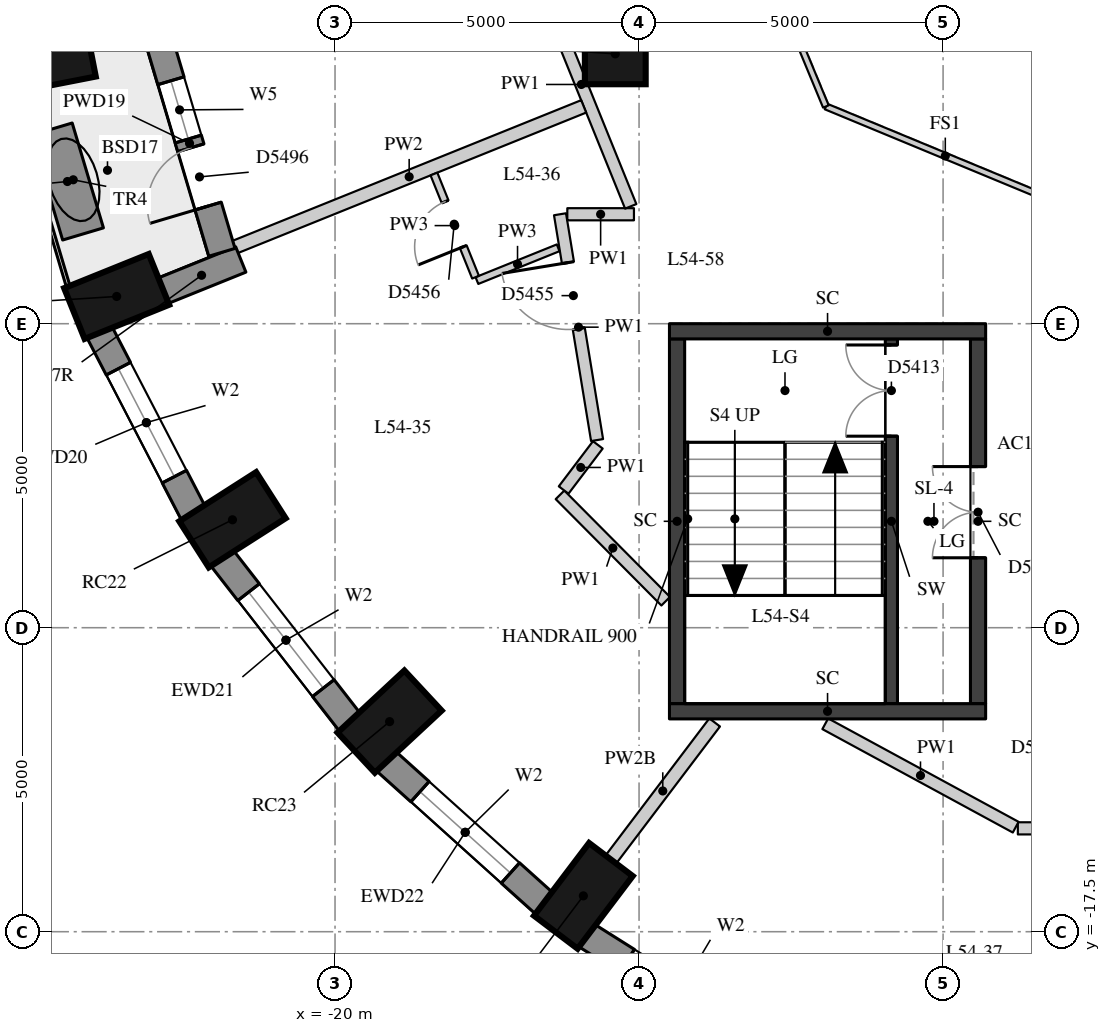
"""IFC4 building model, lengths in metres.
Left out: names, types, materials, properties, quantities, classifications, styles, units other than length and angle.
Written with IfcOpenShell. Run it as: python <this file> out.ifc"""

import sys

from ifc_helpers import new_model, si_unit, direction, frame, frame_2d, origin, origin_2d, place, context, subcontext, project, spatial, rectangle, extrude, element, fill, save


model = new_model("IFC4")
c1 = context("Model", 3, precision=1e-05, world=origin(), true_north=direction((0.0, 1.0)))
c2 = subcontext(c1, "Body", "Model", "MODEL_VIEW")
j1 = project(units=[si_unit("LENGTHUNIT", "METRE"), si_unit("PLANEANGLEUNIT", "RADIAN")], contexts=[c1])
p1 = place(None, origin())
s1 = spatial("IfcSite", under=j1, at=p1, CompositionType="ELEMENT")
p2 = place(p1, origin())
s2 = spatial("IfcBuilding", under=s1, at=p2, CompositionType="ELEMENT")
p3 = place(p2, frame((0.0, 0.0, 192.5)))
s3 = spatial("IfcBuildingStorey", under=s2, at=p3, CompositionType="ELEMENT", Elevation=192.5)
for number, where, z_axis, x_axis in (
    (1, (-24.757, -3.137, 0.0), (0.0, 0.0, 1.0), (-0.981, -0.192, 0.0)),
    (2, (-23.591, -7.052, 0.0), (0.0, 0.0, 1.0), (-0.927, -0.374, 0.0)),
    (3, (-21.687, -10.725, 0.0), (0.0, 0.0, 1.0), (-0.842, -0.539, 0.0)),
    (4, (-19.102, -14.045, 0.0), (0.0, 0.0, 1.0), (-0.732, -0.681, 0.0)),
    (5, (-15.916, -16.911, 0.0), (0.0, 0.0, 1.0), (-0.604, -0.797, 0.0)),
):
    element("IfcColumn", number, at=place(p3, frame(where, z_axis=z_axis, x_axis=x_axis)), inside=s3, PredefinedType="COLUMN", context=c2, shape_type="SweptSolid", body=[
        extrude(rectangle(XDim=1.5, YDim=0.9, at=origin_2d()), origin(), (0.0, 0.0, 1.0), 3.3),
    ])
p4 = place(p3, frame((-15.391, -3.062, 0.0), z_axis=(0.0, 0.0, 1.0), x_axis=(1.0, 0.0, 0.0)))
e6 = element("IfcColumn", 6, at=p4, inside=s3, PredefinedType="COLUMN", context=c2, shape_type="SweptSolid", body=[
    extrude(rectangle(XDim=1.0, YDim=1.0, at=origin_2d()), origin(), (0.0, 0.0, 1.0), 3.3),
])
p5 = place(p3, frame((-23.878, -7.632, 0.0), z_axis=(0.0, 0.0, 1.0), x_axis=(0.460232593174, -0.887798378113, 0.0)))
e7 = element("IfcWall", 7, at=p5, inside=s3, PredefinedType="SOLIDWALL", context=c2, shape_type="SweptSolid", body=[
    extrude(rectangle(XDim=3.371, YDim=0.45, at=frame_2d((1.685, 0.0))), origin(), (0.0, 0.0, 1.0), 3.02),
])
p6 = place(p5, frame((0.685, 0.0, 0.4)))
e8 = element("IfcOpeningElement", 8, at=p6, cuts=e7, PredefinedType="OPENING", context=c2, shape_type="SweptSolid", body=[
    extrude(rectangle(XDim=2.0, YDim=1.75, at=frame_2d((1.0, 0.875))), frame((0.0, 0.235, 0.0), z_axis=(0.0, -1.0, 0.0), x_axis=(1.0, 0.0, 0.0)), (0.0, 0.0, 1.0), 0.47),
])
p7 = place(p3, frame((-21.863, -11.348, 0.0), z_axis=(0.0, 0.0, 1.0), x_axis=(0.614255239631, -0.789107407509, 0.0)))
e9 = element("IfcWall", 9, at=p7, inside=s3, PredefinedType="SOLIDWALL", context=c2, shape_type="SweptSolid", body=[
    extrude(rectangle(XDim=3.438, YDim=0.45, at=frame_2d((1.719, 0.0))), origin(), (0.0, 0.0, 1.0), 3.02),
])
p8 = place(p7, frame((0.719, 0.0, 0.4)))
e10 = element("IfcOpeningElement", 10, at=p8, cuts=e9, PredefinedType="OPENING", context=c2, shape_type="SweptSolid", body=[
    extrude(rectangle(XDim=2.0, YDim=1.75, at=frame_2d((1.0, 0.875))), frame((0.0, 0.235, 0.0), z_axis=(0.0, -1.0, 0.0), x_axis=(1.0, 0.0, 0.0)), (0.0, 0.0, 1.0), 0.47),
])
p9 = place(p3, frame((-19.165, -14.69, 0.0), z_axis=(0.0, 0.0, 1.0), x_axis=(0.743442727602, -0.668799604348, 0.0)))
e11 = element("IfcWall", 11, at=p9, inside=s3, PredefinedType="SOLIDWALL", context=c2, shape_type="SweptSolid", body=[
    extrude(rectangle(XDim=3.513, YDim=0.45, at=frame_2d((1.756, 0.0))), origin(), (0.0, 0.0, 1.0), 3.02),
])
p10 = place(p9, frame((0.756, 0.0, 0.4)))
e12 = element("IfcOpeningElement", 12, at=p10, cuts=e11, PredefinedType="OPENING", context=c2, shape_type="SweptSolid", body=[
    extrude(rectangle(XDim=2.0, YDim=1.75, at=frame_2d((1.0, 0.875))), frame((0.0, 0.235, 0.0), z_axis=(0.0, -1.0, 0.0), x_axis=(1.0, 0.0, 0.0)), (0.0, 0.0, 1.0), 0.47),
])
p11 = place(p3, frame((-15.867, -17.559, 0.0), z_axis=(0.0, 0.0, 1.0), x_axis=(0.84616917791, -0.532914366813, 0.0)))
e13 = element("IfcWall", 13, at=p11, inside=s3, PredefinedType="SOLIDWALL", context=c2, shape_type="SweptSolid", body=[
    extrude(rectangle(XDim=3.587, YDim=0.45, at=frame_2d((1.793, 0.0))), origin(), (0.0, 0.0, 1.0), 3.02),
])
p12 = place(p11, frame((0.793, 0.0, 0.4)))
e14 = element("IfcOpeningElement", 14, at=p12, cuts=e13, PredefinedType="OPENING", context=c2, shape_type="SweptSolid", body=[
    extrude(rectangle(XDim=2.0, YDim=1.75, at=frame_2d((1.0, 0.875))), frame((0.0, 0.235, 0.0), z_axis=(0.0, -1.0, 0.0), x_axis=(1.0, 0.0, 0.0)), (0.0, 0.0, 1.0), 0.47),
])
p13 = place(p3, frame((-22.84, -6.964, 0.0), z_axis=(0.0, 0.0, 1.0), x_axis=(0.92737073954, 0.374143704271, 0.0)))
e15 = element("IfcWall", 15, at=p13, inside=s3, PredefinedType="SOLIDWALL", context=c2, shape_type="SweptSolid", body=[
    extrude(rectangle(XDim=1.391, YDim=0.45, at=frame_2d((0.695, 0.0))), origin(), (0.0, 0.0, 1.0), 3.02),
])
p14 = place(p3, frame((-22.925, -2.743, 0.0), z_axis=(0.0, 0.0, 1.0), x_axis=(0.284722093158, -0.958610103049, 0.0)))
e16 = element("IfcWall", 16, at=p14, inside=s3, PredefinedType="SOLIDWALL", context=c2, shape_type="SweptSolid", body=[
    extrude(rectangle(XDim=3.738, YDim=0.45, at=frame_2d((1.869, 0.0))), origin(), (0.0, 0.0, 1.0), 3.02),
])
p15 = place(p14, frame((0.794, 0.0, 0.4)))
e17 = element("IfcOpeningElement", 17, at=p15, cuts=e16, PredefinedType="OPENING", context=c2, shape_type="SweptSolid", body=[
    extrude(rectangle(XDim=1.0, YDim=1.75, at=frame_2d((0.5, 0.875))), frame((0.0, 0.235, 0.0), z_axis=(0.0, -1.0, 0.0), x_axis=(1.0, 0.0, 0.0)), (0.0, 0.0, 1.0), 0.47),
])
p16 = place(p14, frame((1.944, 0.0, 0.0)))
e18 = element("IfcOpeningElement", 18, at=p16, cuts=e16, PredefinedType="OPENING", context=c2, shape_type="SweptSolid", body=[
    extrude(rectangle(XDim=1.0, YDim=2.15, at=frame_2d((0.5, 1.075))), frame((0.0, 0.235, 0.0), z_axis=(0.0, -1.0, 0.0), x_axis=(1.0, 0.0, 0.0)), (0.0, 0.0, 1.0), 0.47),
])
p17 = place(p3, frame((-24.658, -4.299, 0.0), z_axis=(0.0, 0.0, 1.0), x_axis=(0.285505743157, -0.958376998171, 0.0)))
e19 = element("IfcWall", 19, at=p17, inside=s3, PredefinedType="USERDEFINED", context=c2, shape_type="SweptSolid", body=[
    extrude(rectangle(XDim=1.8, YDim=0.7, at=frame_2d((0.9, 0.0))), origin(), (0.0, 0.0, 1.0), 0.75),
])
p18 = place(p3, frame((-10.85, -13.75, 0.0), z_axis=(0.0, 0.0, 1.0), x_axis=(0.0, 1.0, 0.0)))
e20 = element("IfcWall", 20, at=p18, inside=s3, PredefinedType="SHEAR", context=c2, shape_type="SweptSolid", body=[
    extrude(rectangle(XDim=6.0, YDim=0.2, at=frame_2d((3.0, 0.0))), origin(), (0.0, 0.0, 1.0), 3.02),
])
p19 = place(p18, frame((4.4, 0.0, 0.0)))
e21 = element("IfcOpeningElement", 21, at=p19, cuts=e20, PredefinedType="OPENING", context=c2, shape_type="SweptSolid", body=[
    extrude(rectangle(XDim=1.5, YDim=2.1, at=frame_2d((0.75, 1.05))), frame((0.0, 0.11, 0.0), z_axis=(0.0, -1.0, 0.0), x_axis=(1.0, 0.0, 0.0)), (0.0, 0.0, 1.0), 0.22),
])
p20 = place(p3, frame((-14.375, -13.75, -0.28), z_axis=(0.0, 0.0, 1.0), x_axis=(0.0, 1.0, 0.0)))
e22 = element("IfcWall", 22, at=p20, inside=s3, PredefinedType="SHEAR", context=c2, shape_type="SweptSolid", body=[
    extrude(rectangle(XDim=6.0, YDim=0.25, at=frame_2d((3.0, 0.0))), origin(), (0.0, 0.0, 1.0), 3.3),
])
p21 = place(p3, frame((-9.425, -13.75, -0.28), z_axis=(0.0, 0.0, 1.0), x_axis=(0.0, 1.0, 0.0)))
e23 = element("IfcWall", 23, at=p21, inside=s3, PredefinedType="SHEAR", context=c2, shape_type="SweptSolid", body=[
    extrude(rectangle(XDim=6.0, YDim=0.25, at=frame_2d((3.0, 0.0))), origin(), (0.0, 0.0, 1.0), 3.3),
])
p22 = place(p21, frame((2.4, 0.0, 0.28)))
e24 = element("IfcOpeningElement", 24, at=p22, cuts=e23, PredefinedType="OPENING", context=c2, shape_type="SweptSolid", body=[
    extrude(rectangle(XDim=1.5, YDim=2.1, at=frame_2d((0.75, 1.05))), frame((0.0, 0.135, 0.0), z_axis=(0.0, -1.0, 0.0), x_axis=(1.0, 0.0, 0.0)), (0.0, 0.0, 1.0), 0.27),
])
for number, where, z_axis, x_axis in (
    (25, (-14.5, -7.625, -0.28), (0.0, 0.0, 1.0), (1.0, 0.0, 0.0)),
    (26, (-14.5, -13.875, -0.28), (0.0, 0.0, 1.0), (1.0, 0.0, 0.0)),
):
    element("IfcWall", number, at=place(p3, frame(where, z_axis=z_axis, x_axis=x_axis)), inside=s3, PredefinedType="SHEAR", context=c2, shape_type="SweptSolid", body=[
        extrude(rectangle(XDim=5.2, YDim=0.25, at=frame_2d((2.6, 0.0))), origin(), (0.0, 0.0, 1.0), 3.3),
    ])
p23 = place(p3, frame((-7.8, -15.8, 0.0), z_axis=(0.0, 0.0, 1.0), x_axis=(-1.0, 0.0, 0.0)))
e27 = element("IfcWall", 27, at=p23, inside=s3, PredefinedType="PARTITIONING", context=c2, shape_type="SweptSolid", body=[
    extrude(rectangle(XDim=0.97, YDim=0.2, at=frame_2d((0.485, 0.0))), origin(), (0.0, 0.0, 1.0), 3.02),
])
p24 = place(p3, frame((-8.806, -15.781, 0.0), z_axis=(0.0, 0.0, 1.0), x_axis=(-0.878760680736, 0.477262680284, 0.0)))
e28 = element("IfcWall", 28, at=p24, inside=s3, PredefinedType="PARTITIONING", context=c2, shape_type="SweptSolid", body=[
    extrude(rectangle(XDim=3.564, YDim=0.2, at=frame_2d((1.782, 0.0))), origin(), (0.0, 0.0, 1.0), 3.02),
])
p25 = place(p3, frame((-14.562, -12.064, 0.0), z_axis=(0.0, 0.0, 1.0), x_axis=(-0.704826289083, 0.709379942074, 0.0)))
e29 = element("IfcWall", 29, at=p25, inside=s3, PredefinedType="PARTITIONING", context=c2, shape_type="SweptSolid", body=[
    extrude(rectangle(XDim=2.466, YDim=0.2, at=frame_2d((1.233, 0.0))), origin(), (0.0, 0.0, 1.0), 3.02),
])
p26 = place(p3, frame((-16.24, -10.236, 0.0), z_axis=(0.0, 0.0, 1.0), x_axis=(0.60389301212, 0.797065386222, 0.0)))
e30 = element("IfcWall", 30, at=p26, inside=s3, PredefinedType="PARTITIONING", context=c2, shape_type="SweptSolid", body=[
    extrude(rectangle(XDim=0.931, YDim=0.2, at=frame_2d((0.466, 0.0))), origin(), (0.0, 0.0, 1.0), 3.02),
])
p27 = place(p3, frame((-15.69, -9.414, 0.0), z_axis=(0.0, 0.0, 1.0), x_axis=(-0.161968669214, 0.986795900981, 0.0)))
e31 = element("IfcWall", 31, at=p27, inside=s3, PredefinedType="PARTITIONING", context=c2, shape_type="SweptSolid", body=[
    extrude(rectangle(XDim=3.764, YDim=0.2, at=frame_2d((1.882, 0.0))), origin(), (0.0, 0.0, 1.0), 3.02),
])
p28 = place(p27, frame((1.858, 0.0, 0.0)))
e32 = element("IfcOpeningElement", 32, at=p28, cuts=e31, PredefinedType="OPENING", context=c2, shape_type="SweptSolid", body=[
    extrude(rectangle(XDim=1.1, YDim=2.1, at=frame_2d((0.55, 1.05))), frame((0.0, 0.11, 0.0), z_axis=(0.0, -1.0, 0.0), x_axis=(1.0, 0.0, 0.0)), (0.0, 0.0, 1.0), 0.22),
])
p29 = place(p3, frame((-16.18, -5.7, 0.0), z_axis=(0.0, 0.0, 1.0), x_axis=(1.0, 0.0, 0.0)))
e33 = element("IfcWall", 33, at=p29, inside=s3, PredefinedType="PARTITIONING", context=c2, shape_type="SweptSolid", body=[
    extrude(rectangle(XDim=1.096, YDim=0.2, at=frame_2d((0.548, 0.0))), origin(), (0.0, 0.0, 1.0), 3.02),
])
p30 = place(p3, frame((-15.137, -5.57, 0.0), z_axis=(0.0, 0.0, 1.0), x_axis=(-0.375464059939, 0.926836954213, 0.0)))
e34 = element("IfcWall", 34, at=p30, inside=s3, PredefinedType="PARTITIONING", context=c2, shape_type="SweptSolid", body=[
    extrude(rectangle(XDim=4.326, YDim=0.2, at=frame_2d((2.163, 0.0))), origin(), (0.0, 0.0, 1.0), 3.02),
])
p31 = place(p3, frame((-21.651, -6.241, 0.0), z_axis=(0.0, 0.0, 1.0), x_axis=(0.927381885483, 0.374116076208, 0.0)))
e35 = element("IfcWall", 35, at=p31, inside=s3, PredefinedType="PARTITIONING", context=c2, shape_type="SweptSolid", body=[
    extrude(rectangle(XDim=6.19, YDim=0.22, at=frame_2d((3.095, 0.0))), origin(), (0.0, 0.0, 1.0), 3.02),
])
p32 = place(p3, frame((-15.463, -16.312, 0.0), z_axis=(0.0, 0.0, 1.0), x_axis=(0.603613294085, 0.797277236101, 0.0)))
e36 = element("IfcWall", 36, at=p32, inside=s3, PredefinedType="PARTITIONING", context=c2, shape_type="SweptSolid", body=[
    extrude(rectangle(XDim=2.828, YDim=0.22, at=frame_2d((1.414, 0.0))), origin(), (0.0, 0.0, 1.0), 2.57),
])
p33 = place(p3, frame((-16.331, -6.252, 0.0), z_axis=(0.0, 0.0, 1.0), x_axis=(-0.927409233125, -0.374048278053, 0.0)))
e37 = element("IfcWall", 37, at=p33, inside=s3, PredefinedType="PARTITIONING", context=c2, shape_type="SweptSolid", body=[
    extrude(rectangle(XDim=1.44, YDim=0.12, at=frame_2d((0.72, 0.0))), origin(), (0.0, 0.0, 1.0), 3.02),
])
p34 = place(p3, frame((-17.689, -6.735, 0.0), z_axis=(0.0, 0.0, 1.0), x_axis=(-0.374057168462, 0.927405647342, 0.0)))
e38 = element("IfcWall", 38, at=p34, inside=s3, PredefinedType="PARTITIONING", context=c2, shape_type="SweptSolid", body=[
    extrude(rectangle(XDim=1.83, YDim=0.12, at=frame_2d((0.915, 0.0))), origin(), (0.0, 0.0, 1.0), 3.02),
])
p35 = place(p34, frame((0.54, 0.0, 0.0)))
e39 = element("IfcOpeningElement", 39, at=p35, cuts=e38, PredefinedType="OPENING", context=c2, shape_type="SweptSolid", body=[
    extrude(rectangle(XDim=0.8, YDim=2.1, at=frame_2d((0.4, 1.05))), frame((0.0, 0.07, 0.0), z_axis=(0.0, -1.0, 0.0), x_axis=(1.0, 0.0, 0.0)), (0.0, 0.0, 1.0), 0.14),
])
for number, where, z_axis, x_axis in (
    (40, (-8.0, -5.554, 0.0), (0.0, 0.0, 1.0), (-0.924, 0.383, 0.0)),
    (41, (-11.927, -3.927, 0.0), (0.0, 0.0, 1.0), (-0.383, 0.924, 0.0)),
):
    element("IfcWall", number, at=place(p3, frame(where, z_axis=z_axis, x_axis=x_axis)), inside=s3, PredefinedType="PARTITIONING", context=c2, shape_type="SweptSolid", body=[
        extrude(rectangle(XDim=4.251, YDim=0.1, at=frame_2d((2.125, 0.0))), origin(), (0.0, 0.0, 1.0), 3.02),
    ])
p36 = place(p6, origin())
e42 = element("IfcWindow", 42, at=p36, inside=s3, PartitioningType="SINGLE_PANEL", PredefinedType="WINDOW", context=c2, shape_type="SweptSolid", body=[
    extrude(rectangle(XDim=2.0, YDim=1.75, at=frame_2d((1.0, 0.875))), frame((0.0, 0.035, 0.0), z_axis=(0.0, -1.0, 0.0), x_axis=(1.0, 0.0, 0.0)), (0.0, 0.0, 1.0), 0.06),
])
fill(e8, e42)
p37 = place(p8, origin())
e43 = element("IfcWindow", 43, at=p37, inside=s3, PartitioningType="SINGLE_PANEL", PredefinedType="WINDOW", context=c2, shape_type="SweptSolid", body=[
    extrude(rectangle(XDim=2.0, YDim=1.75, at=frame_2d((1.0, 0.875))), frame((0.0, 0.035, 0.0), z_axis=(0.0, -1.0, 0.0), x_axis=(1.0, 0.0, 0.0)), (0.0, 0.0, 1.0), 0.06),
])
fill(e10, e43)
p38 = place(p10, origin())
e44 = element("IfcWindow", 44, at=p38, inside=s3, PartitioningType="SINGLE_PANEL", PredefinedType="WINDOW", context=c2, shape_type="SweptSolid", body=[
    extrude(rectangle(XDim=2.0, YDim=1.75, at=frame_2d((1.0, 0.875))), frame((0.0, 0.035, 0.0), z_axis=(0.0, -1.0, 0.0), x_axis=(1.0, 0.0, 0.0)), (0.0, 0.0, 1.0), 0.06),
])
fill(e12, e44)
p39 = place(p15, origin())
e45 = element("IfcWindow", 45, at=p39, inside=s3, PartitioningType="SINGLE_PANEL", PredefinedType="WINDOW", context=c2, shape_type="SweptSolid", body=[
    extrude(rectangle(XDim=1.0, YDim=1.75, at=frame_2d((0.5, 0.875))), frame((0.0, 0.035, 0.0), z_axis=(0.0, -1.0, 0.0), x_axis=(1.0, 0.0, 0.0)), (0.0, 0.0, 1.0), 0.06),
])
fill(e17, e45)
p40 = place(p16, frame((1.0, 0.0, 0.0), z_axis=(0.0, 0.0, 1.0), x_axis=(-1.0, 0.0, 0.0)))
e46 = element("IfcDoor", 46, at=p40, inside=s3, OperationType="SINGLE_SWING_LEFT", PredefinedType="DOOR", context=c2, shape_type="SweptSolid", body=[
    extrude(rectangle(XDim=1.0, YDim=2.15, at=frame_2d((0.5, 1.075))), frame((0.0, 0.075, 0.0), z_axis=(0.0, -1.0, 0.0), x_axis=(1.0, 0.0, 0.0)), (0.0, 0.0, 1.0), 0.05),
])
fill(e18, e46)
p41 = place(p19, origin())
e47 = element("IfcDoor", 47, at=p41, inside=s3, OperationType="DOUBLE_DOOR_SINGLE_SWING", PredefinedType="DOOR", context=c2, shape_type="SweptSolid", body=[
    extrude(rectangle(XDim=1.5, YDim=2.1, at=frame_2d((0.75, 1.05))), frame((0.0, 0.025, 0.0), z_axis=(0.0, -1.0, 0.0), x_axis=(1.0, 0.0, 0.0)), (0.0, 0.0, 1.0), 0.05),
])
fill(e21, e47)
p42 = place(p22, origin())
e48 = element("IfcDoor", 48, at=p42, inside=s3, OperationType="DOUBLE_DOOR_SINGLE_SWING", PredefinedType="DOOR", context=c2, shape_type="SweptSolid", body=[
    extrude(rectangle(XDim=1.5, YDim=2.1, at=frame_2d((0.75, 1.05))), frame((0.0, 0.025, 0.0), z_axis=(0.0, -1.0, 0.0), x_axis=(1.0, 0.0, 0.0)), (0.0, 0.0, 1.0), 0.05),
])
fill(e24, e48)
p43 = place(p28, origin())
e49 = element("IfcDoor", 49, at=p43, inside=s3, OperationType="SINGLE_SWING_RIGHT", PredefinedType="DOOR", context=c2, shape_type="SweptSolid", body=[
    extrude(rectangle(XDim=1.1, YDim=2.1, at=frame_2d((0.55, 1.05))), frame((0.0, 0.025, 0.0), z_axis=(0.0, -1.0, 0.0), x_axis=(1.0, 0.0, 0.0)), (0.0, 0.0, 1.0), 0.05),
])
fill(e32, e49)
p44 = place(p35, origin())
e50 = element("IfcDoor", 50, at=p44, inside=s3, OperationType="SINGLE_SWING_LEFT", PredefinedType="DOOR", context=c2, shape_type="SweptSolid", body=[
    extrude(rectangle(XDim=0.8, YDim=2.1, at=frame_2d((0.4, 1.05))), frame((0.0, 0.025, 0.0), z_axis=(0.0, -1.0, 0.0), x_axis=(1.0, 0.0, 0.0)), (0.0, 0.0, 1.0), 0.05),
])
fill(e39, e50)
save(model, sys.argv[1])
